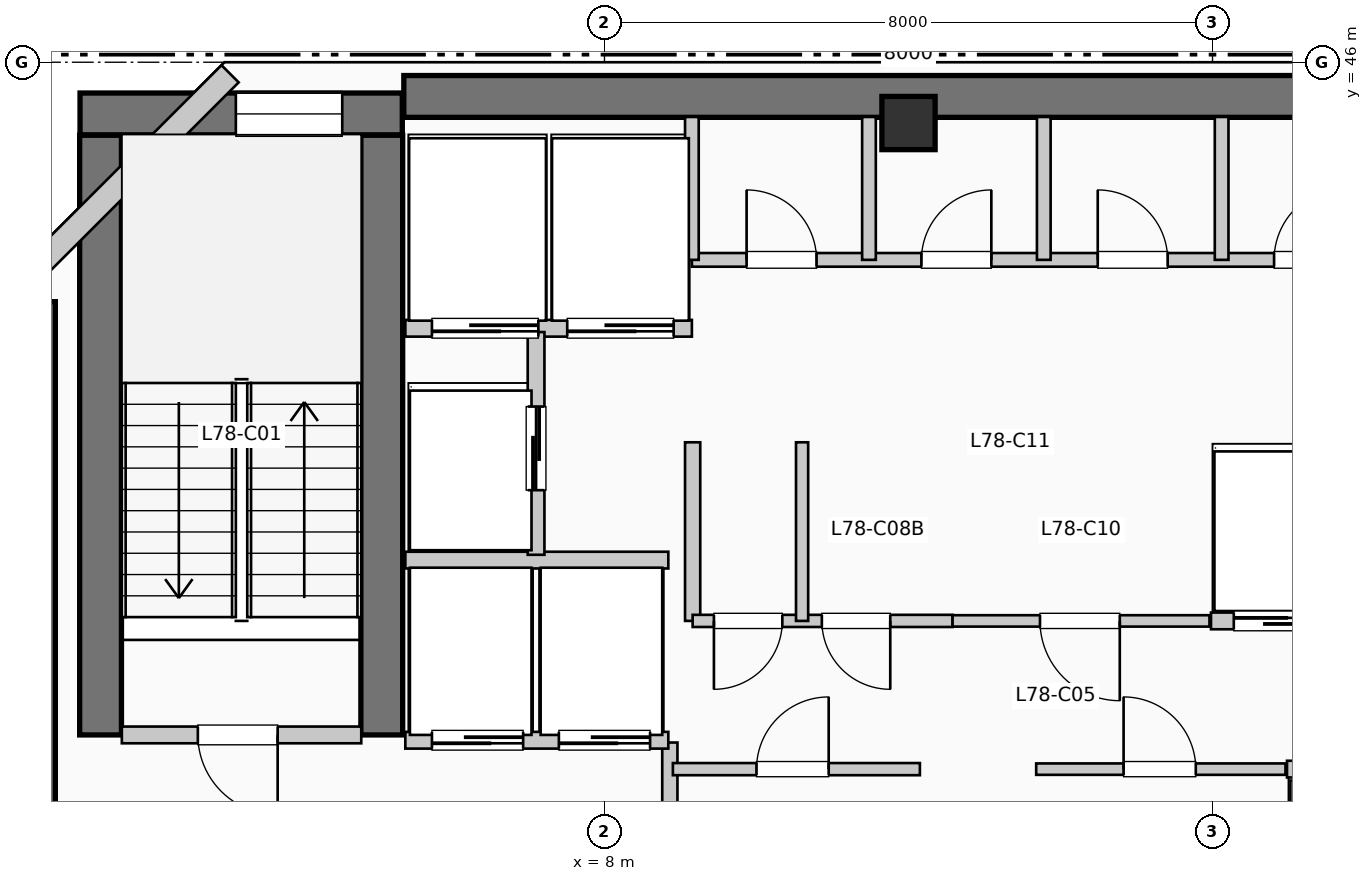
"""IFC4 building model, lengths in metres.
Left out: names, types, materials, properties, quantities, classifications, styles, units other than length and angle.
Written with IfcOpenShell. Run it as: python <this file> out.ifc"""

import sys

from ifc_helpers import new_model, si_unit, direction, frame, frame_2d, origin, origin_2d, place, context, subcontext, project, spatial, rectangle, extrude, element, fill, save


model = new_model("IFC4")
c1 = context("Model", 3, precision=1e-05, world=origin(), true_north=direction((0.0, 1.0)))
c2 = subcontext(c1, "Body", "Model", "MODEL_VIEW")
j1 = project(units=[si_unit("LENGTHUNIT", "METRE"), si_unit("PLANEANGLEUNIT", "RADIAN")], contexts=[c1])
p1 = place(None, origin())
s1 = spatial("IfcSite", under=j1, at=p1, CompositionType="ELEMENT")
p2 = place(p1, origin())
s2 = spatial("IfcBuilding", under=s1, at=p2, CompositionType="ELEMENT")
p3 = place(p2, frame((0.0, 0.0, 319.77)))
s3 = spatial("IfcBuildingStorey", under=s2, at=p3, CompositionType="ELEMENT", Elevation=319.77)
p4 = place(p3, frame((5.36, 45.55, 0.0), z_axis=(0.0, 0.0, 1.0), x_axis=(1.0, 0.0, 0.0)))
e1 = element("IfcWall", 1, at=p4, inside=s3, PredefinedType="SHEAR", context=c2, shape_type="SweptSolid", body=[
    extrude(rectangle(XDim=13.98, YDim=0.55, at=frame_2d((6.99, 0.0))), origin(), (0.0, 0.0, 1.0), 3.96),
])
p5 = place(p3, frame((0.5, 34.95, 0.0), z_axis=(0.0, 0.0, 1.0), x_axis=(0.0, 1.0, 0.0)))
e2 = element("IfcWall", 2, at=p5, inside=s3, PredefinedType="SHEAR", context=c2, shape_type="SweptSolid", body=[
    extrude(rectangle(XDim=7.9, YDim=0.55, at=frame_2d((3.95, 0.0))), origin(), (0.0, 0.0, 1.0), 3.96),
])
for number, where, z_axis, x_axis in (
    (3, (1.37, 37.15, 0.0), (0.0, 0.0, 1.0), (0.0, 1.0, 0.0)),
    (4, (5.07, 37.15, 0.0), (0.0, 0.0, 1.0), (0.0, 1.0, 0.0)),
):
    element("IfcWall", number, at=place(p3, frame(where, z_axis=z_axis, x_axis=x_axis)), inside=s3, PredefinedType="SHEAR", context=c2, shape_type="SweptSolid", body=[
        extrude(rectangle(XDim=7.89, YDim=0.55, at=frame_2d((3.945, 0.0))), origin(), (0.0, 0.0, 1.0), 3.96),
    ])
p6 = place(p3, frame((1.1, 45.32, 0.0), z_axis=(0.0, 0.0, 1.0), x_axis=(1.0, 0.0, 0.0)))
e5 = element("IfcWall", 5, at=p6, inside=s3, PredefinedType="SHEAR", context=c2, shape_type="SweptSolid", body=[
    extrude(rectangle(XDim=4.24, YDim=0.55, at=frame_2d((2.12, 0.0))), origin(), (0.0, 0.0, 1.0), 3.96),
])
p7 = place(p6, frame((2.05, 0.0, 1.05)))
e6 = element("IfcOpeningElement", 6, at=p7, cuts=e5, PredefinedType="OPENING", context=c2, shape_type="SweptSolid", body=[
    extrude(rectangle(XDim=1.4, YDim=1.8, at=frame_2d((0.7, 0.9))), frame((0.0, 0.285, 0.0), z_axis=(0.0, -1.0, 0.0), x_axis=(1.0, 0.0, 0.0)), (0.0, 0.0, 1.0), 0.57),
])
p8 = place(p3, frame((12.0, 45.2, 0.0), z_axis=(0.0, 0.0, 1.0), x_axis=(1.0, 0.0, 0.0)))
e7 = element("IfcColumn", 7, at=p8, inside=s3, PredefinedType="COLUMN", context=c2, shape_type="SweptSolid", body=[
    extrude(rectangle(XDim=0.7, YDim=0.7, at=origin_2d()), origin(), (0.0, 0.0, 1.0), 3.96),
])
p9 = place(p3, frame((3.074, 45.848, 0.0), z_axis=(0.0, 0.0, 1.0), x_axis=(-0.707106781187, -0.707106781187, 0.0)))
e8 = element("IfcWall", 8, at=p9, inside=s3, PredefinedType="SOLIDWALL", context=c2, shape_type="SweptSolid", body=[
    extrude(rectangle(XDim=4.133, YDim=0.32, at=frame_2d((2.066, 0.0))), origin(), (0.0, 0.0, 1.0), 3.74),
])
p10 = place(p3, frame((1.65, 37.15, 0.0), z_axis=(0.0, 0.0, 1.0), x_axis=(1.0, 0.0, 0.0)))
e9 = element("IfcWall", 9, at=p10, inside=s3, PredefinedType="PARTITIONING", context=c2, shape_type="SweptSolid", body=[
    extrude(rectangle(XDim=3.15, YDim=0.22, at=frame_2d((1.575, 0.0))), origin(), (0.0, 0.0, 1.0), 3.74),
])
p11 = place(p10, frame((2.05, 0.0, 0.0), z_axis=(0.0, 0.0, 1.0), x_axis=(-1.0, 0.0, 0.0)))
e10 = element("IfcOpeningElement", 10, at=p11, cuts=e9, PredefinedType="OPENING", context=c2, shape_type="SweptSolid", body=[
    extrude(rectangle(XDim=1.05, YDim=2.15, at=frame_2d((0.525, 1.075))), frame((0.0, 0.12, 0.0), z_axis=(0.0, -1.0, 0.0), x_axis=(1.0, 0.0, 0.0)), (0.0, 0.0, 1.0), 0.24),
])
p12 = place(p3, frame((8.86, 34.55, 0.0), z_axis=(0.0, 0.0, 1.0), x_axis=(0.0, 1.0, 0.0)))
e11 = element("IfcWall", 11, at=p12, inside=s3, PredefinedType="PARTITIONING", context=c2, shape_type="SweptSolid", body=[
    extrude(rectangle(XDim=2.5, YDim=0.2, at=frame_2d((1.25, 0.0))), origin(), (0.0, 0.0, 1.0), 3.74),
])
p13 = place(p3, frame((5.38, 37.08, 0.0), z_axis=(0.0, 0.0, 1.0), x_axis=(1.0, 0.0, 0.0)))
e12 = element("IfcWall", 12, at=p13, inside=s3, PredefinedType="PARTITIONING", context=c2, shape_type="SweptSolid", body=[
    extrude(rectangle(XDim=3.46, YDim=0.22, at=frame_2d((1.73, 0.0))), origin(), (0.0, 0.0, 1.0), 3.74),
])
p14 = place(p13, frame((1.55, 0.0, 0.0), z_axis=(0.0, 0.0, 1.0), x_axis=(-1.0, 0.0, 0.0)))
e13 = element("IfcOpeningElement", 13, at=p14, cuts=e12, PredefinedType="OPENING", context=c2, shape_type="SweptSolid", body=[
    extrude(rectangle(XDim=1.2, YDim=2.2, at=frame_2d((0.6, 1.1))), frame((0.0, 0.12, 0.0), z_axis=(0.0, -1.0, 0.0), x_axis=(1.0, 0.0, 0.0)), (0.0, 0.0, 1.0), 0.24),
])
p15 = place(p13, frame((3.22, 0.0, 0.0), z_axis=(0.0, 0.0, 1.0), x_axis=(-1.0, 0.0, 0.0)))
e14 = element("IfcOpeningElement", 14, at=p15, cuts=e12, PredefinedType="OPENING", context=c2, shape_type="SweptSolid", body=[
    extrude(rectangle(XDim=1.2, YDim=2.2, at=frame_2d((0.6, 1.1))), frame((0.0, 0.12, 0.0), z_axis=(0.0, -1.0, 0.0), x_axis=(1.0, 0.0, 0.0)), (0.0, 0.0, 1.0), 0.24),
])
p16 = place(p3, frame((5.38, 39.45, 0.0), z_axis=(0.0, 0.0, 1.0), x_axis=(1.0, 0.0, 0.0)))
e15 = element("IfcWall", 15, at=p16, inside=s3, PredefinedType="PARTITIONING", context=c2, shape_type="SweptSolid", body=[
    extrude(rectangle(XDim=3.46, YDim=0.22, at=frame_2d((1.73, 0.0))), origin(), (0.0, 0.0, 1.0), 3.74),
])
p17 = place(p3, frame((5.38, 42.5, 0.0), z_axis=(0.0, 0.0, 1.0), x_axis=(1.0, 0.0, 0.0)))
e16 = element("IfcWall", 16, at=p17, inside=s3, PredefinedType="PARTITIONING", context=c2, shape_type="SweptSolid", body=[
    extrude(rectangle(XDim=3.77, YDim=0.22, at=frame_2d((1.885, 0.0))), origin(), (0.0, 0.0, 1.0), 3.74),
])
p18 = place(p17, frame((1.75, 0.0, 0.0), z_axis=(0.0, 0.0, 1.0), x_axis=(-1.0, 0.0, 0.0)))
e17 = element("IfcOpeningElement", 17, at=p18, cuts=e16, PredefinedType="OPENING", context=c2, shape_type="SweptSolid", body=[
    extrude(rectangle(XDim=1.4, YDim=2.2, at=frame_2d((0.7, 1.1))), frame((0.0, 0.12, 0.0), z_axis=(0.0, -1.0, 0.0), x_axis=(1.0, 0.0, 0.0)), (0.0, 0.0, 1.0), 0.24),
])
p19 = place(p17, frame((3.53, 0.0, 0.0), z_axis=(0.0, 0.0, 1.0), x_axis=(-1.0, 0.0, 0.0)))
e18 = element("IfcOpeningElement", 18, at=p19, cuts=e16, PredefinedType="OPENING", context=c2, shape_type="SweptSolid", body=[
    extrude(rectangle(XDim=1.4, YDim=2.2, at=frame_2d((0.7, 1.1))), frame((0.0, 0.12, 0.0), z_axis=(0.0, -1.0, 0.0), x_axis=(1.0, 0.0, 0.0)), (0.0, 0.0, 1.0), 0.24),
])
p20 = place(p3, frame((7.1, 39.52, 0.0), z_axis=(0.0, 0.0, 1.0), x_axis=(0.0, 1.0, 0.0)))
e19 = element("IfcWall", 19, at=p20, inside=s3, PredefinedType="PARTITIONING", context=c2, shape_type="SweptSolid", body=[
    extrude(rectangle(XDim=2.93, YDim=0.22, at=frame_2d((1.465, 0.0))), origin(), (0.0, 0.0, 1.0), 3.74),
])
p21 = place(p20, frame((0.85, 0.0, 0.0)))
e20 = element("IfcOpeningElement", 20, at=p21, cuts=e19, PredefinedType="OPENING", context=c2, shape_type="SweptSolid", body=[
    extrude(rectangle(XDim=1.1, YDim=2.2, at=frame_2d((0.55, 1.1))), frame((0.0, 0.12, 0.0), z_axis=(0.0, -1.0, 0.0), x_axis=(1.0, 0.0, 0.0)), (0.0, 0.0, 1.0), 0.24),
])
p22 = place(p3, frame((9.16, 38.65, 0.0), z_axis=(0.0, 0.0, 1.0), x_axis=(0.0, 1.0, 0.0)))
e21 = element("IfcWall", 21, at=p22, inside=s3, PredefinedType="PARTITIONING", context=c2, shape_type="SweptSolid", body=[
    extrude(rectangle(XDim=2.35, YDim=0.2, at=frame_2d((1.175, 0.0))), origin(), (0.0, 0.0, 1.0), 3.74),
])
p23 = place(p3, frame((8.9, 36.7, 0.0), z_axis=(0.0, 0.0, 1.0), x_axis=(1.0, 0.0, 0.0)))
e22 = element("IfcWall", 22, at=p23, inside=s3, PredefinedType="PARTITIONING", context=c2, shape_type="SweptSolid", body=[
    extrude(rectangle(XDim=3.25, YDim=0.16, at=frame_2d((1.625, 0.0))), origin(), (0.0, 0.0, 1.0), 3.74),
])
p24 = place(p23, frame((1.1, 0.0, 0.0)))
e23 = element("IfcOpeningElement", 23, at=p24, cuts=e22, PredefinedType="OPENING", context=c2, shape_type="SweptSolid", body=[
    extrude(rectangle(XDim=0.95, YDim=2.15, at=frame_2d((0.475, 1.075))), frame((0.0, 0.09, 0.0), z_axis=(0.0, -1.0, 0.0), x_axis=(1.0, 0.0, 0.0)), (0.0, 0.0, 1.0), 0.18),
])
p25 = place(p3, frame((9.16, 38.65, 0.0), z_axis=(0.0, 0.0, 1.0), x_axis=(1.0, 0.0, 0.0)))
e24 = element("IfcWall", 24, at=p25, inside=s3, PredefinedType="PARTITIONING", context=c2, shape_type="SweptSolid", body=[
    extrude(rectangle(XDim=3.42, YDim=0.16, at=frame_2d((1.71, 0.0))), origin(), (0.0, 0.0, 1.0), 3.74),
])
p26 = place(p25, frame((1.18, 0.0, 0.0), z_axis=(0.0, 0.0, 1.0), x_axis=(-1.0, 0.0, 0.0)))
e25 = element("IfcOpeningElement", 25, at=p26, cuts=e24, PredefinedType="OPENING", context=c2, shape_type="SweptSolid", body=[
    extrude(rectangle(XDim=0.9, YDim=2.15, at=frame_2d((0.45, 1.075))), frame((0.0, 0.09, 0.0), z_axis=(0.0, -1.0, 0.0), x_axis=(1.0, 0.0, 0.0)), (0.0, 0.0, 1.0), 0.18),
])
p27 = place(p25, frame((2.6, 0.0, 0.0), z_axis=(0.0, 0.0, 1.0), x_axis=(-1.0, 0.0, 0.0)))
e26 = element("IfcOpeningElement", 26, at=p27, cuts=e24, PredefinedType="OPENING", context=c2, shape_type="SweptSolid", body=[
    extrude(rectangle(XDim=0.9, YDim=2.15, at=frame_2d((0.45, 1.075))), frame((0.0, 0.09, 0.0), z_axis=(0.0, -1.0, 0.0), x_axis=(1.0, 0.0, 0.0)), (0.0, 0.0, 1.0), 0.18),
])
p28 = place(p3, frame((10.6, 38.65, 0.0), z_axis=(0.0, 0.0, 1.0), x_axis=(0.0, 1.0, 0.0)))
e27 = element("IfcWall", 27, at=p28, inside=s3, PredefinedType="PARTITIONING", context=c2, shape_type="SweptSolid", body=[
    extrude(rectangle(XDim=2.35, YDim=0.16, at=frame_2d((1.175, 0.0))), origin(), (0.0, 0.0, 1.0), 3.74),
])
p29 = place(p3, frame((13.68, 36.7, 0.0), z_axis=(0.0, 0.0, 1.0), x_axis=(1.0, 0.0, 0.0)))
e28 = element("IfcWall", 28, at=p29, inside=s3, PredefinedType="PARTITIONING", context=c2, shape_type="SweptSolid", body=[
    extrude(rectangle(XDim=3.28, YDim=0.15, at=frame_2d((1.64, 0.0))), origin(), (0.0, 0.0, 1.0), 3.74),
])
p30 = place(p29, frame((1.15, 0.0, 0.0)))
e29 = element("IfcOpeningElement", 29, at=p30, cuts=e28, PredefinedType="OPENING", context=c2, shape_type="SweptSolid", body=[
    extrude(rectangle(XDim=0.95, YDim=2.15, at=frame_2d((0.475, 1.075))), frame((0.0, 0.085, 0.0), z_axis=(0.0, -1.0, 0.0), x_axis=(1.0, 0.0, 0.0)), (0.0, 0.0, 1.0), 0.17),
])
p31 = place(p3, frame((12.58, 38.65, 0.0), z_axis=(0.0, 0.0, 1.0), x_axis=(1.0, 0.0, 0.0)))
e30 = element("IfcWall", 30, at=p31, inside=s3, PredefinedType="PARTITIONING", context=c2, shape_type="SweptSolid", body=[
    extrude(rectangle(XDim=3.38, YDim=0.15, at=frame_2d((1.69, 0.0))), origin(), (0.0, 0.0, 1.0), 3.74),
])
p32 = place(p31, frame((2.2, 0.0, 0.0), z_axis=(0.0, 0.0, 1.0), x_axis=(-1.0, 0.0, 0.0)))
e31 = element("IfcOpeningElement", 31, at=p32, cuts=e30, PredefinedType="OPENING", context=c2, shape_type="SweptSolid", body=[
    extrude(rectangle(XDim=1.05, YDim=2.15, at=frame_2d((0.525, 1.075))), frame((0.0, 0.085, 0.0), z_axis=(0.0, -1.0, 0.0), x_axis=(1.0, 0.0, 0.0)), (0.0, 0.0, 1.0), 0.17),
])
p33 = place(p3, frame((16.98, 36.7, 0.0), z_axis=(0.0, 0.0, 1.0), x_axis=(1.0, 0.0, 0.0)))
e32 = element("IfcWall", 32, at=p33, inside=s3, PredefinedType="PARTITIONING", context=c2, shape_type="SweptSolid", body=[
    extrude(rectangle(XDim=1.7, YDim=0.22, at=frame_2d((0.85, 0.0))), origin(), (0.0, 0.0, 1.0), 3.74),
])
p34 = place(p33, frame((0.3, 0.0, 0.0)))
e33 = element("IfcOpeningElement", 33, at=p34, cuts=e32, PredefinedType="OPENING", context=c2, shape_type="SweptSolid", body=[
    extrude(rectangle(XDim=1.1, YDim=2.2, at=frame_2d((0.55, 1.1))), frame((0.0, 0.12, 0.0), z_axis=(0.0, -1.0, 0.0), x_axis=(1.0, 0.0, 0.0)), (0.0, 0.0, 1.0), 0.24),
])
p35 = place(p3, frame((15.98, 38.65, 0.0), z_axis=(0.0, 0.0, 1.0), x_axis=(1.0, 0.0, 0.0)))
e34 = element("IfcWall", 34, at=p35, inside=s3, PredefinedType="PARTITIONING", context=c2, shape_type="SweptSolid", body=[
    extrude(rectangle(XDim=1.72, YDim=0.22, at=frame_2d((0.86, 0.0))), origin(), (0.0, 0.0, 1.0), 3.74),
])
p36 = place(p35, frame((0.3, 0.0, 0.0)))
e35 = element("IfcOpeningElement", 35, at=p36, cuts=e34, PredefinedType="OPENING", context=c2, shape_type="SweptSolid", body=[
    extrude(rectangle(XDim=1.1, YDim=2.2, at=frame_2d((0.55, 1.1))), frame((0.0, 0.12, 0.0), z_axis=(0.0, -1.0, 0.0), x_axis=(1.0, 0.0, 0.0)), (0.0, 0.0, 1.0), 0.24),
])
p37 = place(p3, frame((9.15, 43.4, 0.0), z_axis=(0.0, 0.0, 1.0), x_axis=(1.0, 0.0, 0.0)))
e36 = element("IfcWall", 36, at=p37, inside=s3, PredefinedType="PLUMBINGWALL", context=c2, shape_type="SweptSolid", body=[
    extrude(rectangle(XDim=9.33, YDim=0.18, at=frame_2d((4.665, 0.0))), origin(), (0.0, 0.0, 1.0), 3.74),
])
p38 = place(p37, frame((0.72, 0.0, 0.0)))
e37 = element("IfcOpeningElement", 37, at=p38, cuts=e36, PredefinedType="OPENING", context=c2, shape_type="SweptSolid", body=[
    extrude(rectangle(XDim=0.92, YDim=2.1, at=frame_2d((0.46, 1.05))), frame((0.0, 0.1, 0.0), z_axis=(0.0, -1.0, 0.0), x_axis=(1.0, 0.0, 0.0)), (0.0, 0.0, 1.0), 0.2),
])
p39 = place(p37, frame((3.02, 0.0, 0.0)))
e38 = element("IfcOpeningElement", 38, at=p39, cuts=e36, PredefinedType="OPENING", context=c2, shape_type="SweptSolid", body=[
    extrude(rectangle(XDim=0.92, YDim=2.1, at=frame_2d((0.46, 1.05))), frame((0.0, 0.1, 0.0), z_axis=(0.0, -1.0, 0.0), x_axis=(1.0, 0.0, 0.0)), (0.0, 0.0, 1.0), 0.2),
])
p40 = place(p37, frame((5.34, 0.0, 0.0)))
e39 = element("IfcOpeningElement", 39, at=p40, cuts=e36, PredefinedType="OPENING", context=c2, shape_type="SweptSolid", body=[
    extrude(rectangle(XDim=0.92, YDim=2.1, at=frame_2d((0.46, 1.05))), frame((0.0, 0.1, 0.0), z_axis=(0.0, -1.0, 0.0), x_axis=(1.0, 0.0, 0.0)), (0.0, 0.0, 1.0), 0.2),
])
p41 = place(p37, frame((7.66, 0.0, 0.0)))
e40 = element("IfcOpeningElement", 40, at=p41, cuts=e36, PredefinedType="OPENING", context=c2, shape_type="SweptSolid", body=[
    extrude(rectangle(XDim=0.95, YDim=2.1, at=frame_2d((0.475, 1.05))), frame((0.0, 0.1, 0.0), z_axis=(0.0, -1.0, 0.0), x_axis=(1.0, 0.0, 0.0)), (0.0, 0.0, 1.0), 0.2),
])
for number, where, z_axis, x_axis in (
    (41, (9.15, 43.4, 0.0), (0.0, 0.0, 1.0), (0.0, 1.0, 0.0)),
    (42, (11.48, 43.4, 0.0), (0.0, 0.0, 1.0), (0.0, 1.0, 0.0)),
    (43, (13.78, 43.4, 0.0), (0.0, 0.0, 1.0), (0.0, 1.0, 0.0)),
    (44, (16.12, 43.4, 0.0), (0.0, 0.0, 1.0), (0.0, 1.0, 0.0)),
):
    element("IfcWall", number, at=place(p3, frame(where, z_axis=z_axis, x_axis=x_axis)), inside=s3, PredefinedType="PLUMBINGWALL", context=c2, shape_type="SweptSolid", body=[
        extrude(rectangle(XDim=1.88, YDim=0.18, at=frame_2d((0.94, 0.0))), origin(), (0.0, 0.0, 1.0), 3.74),
    ])
p42 = place(p7, origin())
e45 = element("IfcWindow", 45, at=p42, inside=s3, PartitioningType="SINGLE_PANEL", PredefinedType="WINDOW", context=c2, shape_type="SweptSolid", body=[
    extrude(rectangle(XDim=1.4, YDim=1.8, at=frame_2d((0.7, 0.9))), frame((0.0, 0.03, 0.0), z_axis=(0.0, -1.0, 0.0), x_axis=(1.0, 0.0, 0.0)), (0.0, 0.0, 1.0), 0.06),
])
fill(e6, e45)
p43 = place(p11, origin())
e46 = element("IfcDoor", 46, at=p43, inside=s3, OperationType="SINGLE_SWING_RIGHT", PredefinedType="DOOR", context=c2, shape_type="SweptSolid", body=[
    extrude(rectangle(XDim=1.05, YDim=2.15, at=frame_2d((0.525, 1.075))), frame((0.0, 0.025, 0.0), z_axis=(0.0, -1.0, 0.0), x_axis=(1.0, 0.0, 0.0)), (0.0, 0.0, 1.0), 0.05),
])
fill(e10, e46)
p44 = place(p14, origin())
e47 = element("IfcDoor", 47, at=p44, inside=s3, OperationType="SLIDING_TO_RIGHT", PredefinedType="DOOR", context=c2, shape_type="SweptSolid", body=[
    extrude(rectangle(XDim=1.2, YDim=2.2, at=frame_2d((0.6, 1.1))), frame((0.0, 0.025, 0.0), z_axis=(0.0, -1.0, 0.0), x_axis=(1.0, 0.0, 0.0)), (0.0, 0.0, 1.0), 0.05),
])
fill(e13, e47)
p45 = place(p15, origin())
e48 = element("IfcDoor", 48, at=p45, inside=s3, OperationType="SLIDING_TO_RIGHT", PredefinedType="DOOR", context=c2, shape_type="SweptSolid", body=[
    extrude(rectangle(XDim=1.2, YDim=2.2, at=frame_2d((0.6, 1.1))), frame((0.0, 0.025, 0.0), z_axis=(0.0, -1.0, 0.0), x_axis=(1.0, 0.0, 0.0)), (0.0, 0.0, 1.0), 0.05),
])
fill(e14, e48)
p46 = place(p18, origin())
e49 = element("IfcDoor", 49, at=p46, inside=s3, OperationType="SLIDING_TO_LEFT", PredefinedType="DOOR", context=c2, shape_type="SweptSolid", body=[
    extrude(rectangle(XDim=1.4, YDim=2.2, at=frame_2d((0.7, 1.1))), frame((0.0, 0.025, 0.0), z_axis=(0.0, -1.0, 0.0), x_axis=(1.0, 0.0, 0.0)), (0.0, 0.0, 1.0), 0.05),
])
fill(e17, e49)
p47 = place(p19, origin())
e50 = element("IfcDoor", 50, at=p47, inside=s3, OperationType="SLIDING_TO_LEFT", PredefinedType="DOOR", context=c2, shape_type="SweptSolid", body=[
    extrude(rectangle(XDim=1.4, YDim=2.2, at=frame_2d((0.7, 1.1))), frame((0.0, 0.025, 0.0), z_axis=(0.0, -1.0, 0.0), x_axis=(1.0, 0.0, 0.0)), (0.0, 0.0, 1.0), 0.05),
])
fill(e18, e50)
p48 = place(p21, origin())
e51 = element("IfcDoor", 51, at=p48, inside=s3, OperationType="SLIDING_TO_LEFT", PredefinedType="DOOR", context=c2, shape_type="SweptSolid", body=[
    extrude(rectangle(XDim=1.1, YDim=2.2, at=frame_2d((0.55, 1.1))), frame((0.0, 0.025, 0.0), z_axis=(0.0, -1.0, 0.0), x_axis=(1.0, 0.0, 0.0)), (0.0, 0.0, 1.0), 0.05),
])
fill(e20, e51)
p49 = place(p24, origin())
e52 = element("IfcDoor", 52, at=p49, inside=s3, OperationType="SINGLE_SWING_RIGHT", PredefinedType="DOOR", context=c2, shape_type="SweptSolid", body=[
    extrude(rectangle(XDim=0.95, YDim=2.15, at=frame_2d((0.475, 1.075))), frame((0.0, 0.025, 0.0), z_axis=(0.0, -1.0, 0.0), x_axis=(1.0, 0.0, 0.0)), (0.0, 0.0, 1.0), 0.05),
])
fill(e23, e52)
p50 = place(p26, origin())
e53 = element("IfcDoor", 53, at=p50, inside=s3, OperationType="SINGLE_SWING_LEFT", PredefinedType="DOOR", context=c2, shape_type="SweptSolid", body=[
    extrude(rectangle(XDim=0.9, YDim=2.15, at=frame_2d((0.45, 1.075))), frame((0.0, 0.025, 0.0), z_axis=(0.0, -1.0, 0.0), x_axis=(1.0, 0.0, 0.0)), (0.0, 0.0, 1.0), 0.05),
])
fill(e25, e53)
p51 = place(p27, origin())
e54 = element("IfcDoor", 54, at=p51, inside=s3, OperationType="SINGLE_SWING_RIGHT", PredefinedType="DOOR", context=c2, shape_type="SweptSolid", body=[
    extrude(rectangle(XDim=0.9, YDim=2.15, at=frame_2d((0.45, 1.075))), frame((0.0, 0.025, 0.0), z_axis=(0.0, -1.0, 0.0), x_axis=(1.0, 0.0, 0.0)), (0.0, 0.0, 1.0), 0.05),
])
fill(e26, e54)
p52 = place(p30, origin())
e55 = element("IfcDoor", 55, at=p52, inside=s3, OperationType="SINGLE_SWING_LEFT", PredefinedType="DOOR", context=c2, shape_type="SweptSolid", body=[
    extrude(rectangle(XDim=0.95, YDim=2.15, at=frame_2d((0.475, 1.075))), frame((0.0, 0.025, 0.0), z_axis=(0.0, -1.0, 0.0), x_axis=(1.0, 0.0, 0.0)), (0.0, 0.0, 1.0), 0.05),
])
fill(e29, e55)
p53 = place(p32, origin())
e56 = element("IfcDoor", 56, at=p53, inside=s3, OperationType="SINGLE_SWING_RIGHT", PredefinedType="DOOR", context=c2, shape_type="SweptSolid", body=[
    extrude(rectangle(XDim=1.05, YDim=2.15, at=frame_2d((0.525, 1.075))), frame((0.0, 0.025, 0.0), z_axis=(0.0, -1.0, 0.0), x_axis=(1.0, 0.0, 0.0)), (0.0, 0.0, 1.0), 0.05),
])
fill(e31, e56)
p54 = place(p36, origin())
e57 = element("IfcDoor", 57, at=p54, inside=s3, OperationType="SLIDING_TO_LEFT", PredefinedType="DOOR", context=c2, shape_type="SweptSolid", body=[
    extrude(rectangle(XDim=1.1, YDim=2.2, at=frame_2d((0.55, 1.1))), frame((0.0, 0.025, 0.0), z_axis=(0.0, -1.0, 0.0), x_axis=(1.0, 0.0, 0.0)), (0.0, 0.0, 1.0), 0.05),
])
fill(e35, e57)
p55 = place(p38, origin())
e58 = element("IfcDoor", 58, at=p55, inside=s3, OperationType="SINGLE_SWING_LEFT", PredefinedType="DOOR", context=c2, shape_type="SweptSolid", body=[
    extrude(rectangle(XDim=0.92, YDim=2.1, at=frame_2d((0.46, 1.05))), frame((0.0, 0.025, 0.0), z_axis=(0.0, -1.0, 0.0), x_axis=(1.0, 0.0, 0.0)), (0.0, 0.0, 1.0), 0.05),
])
fill(e37, e58)
p56 = place(p39, origin())
e59 = element("IfcDoor", 59, at=p56, inside=s3, OperationType="SINGLE_SWING_RIGHT", PredefinedType="DOOR", context=c2, shape_type="SweptSolid", body=[
    extrude(rectangle(XDim=0.92, YDim=2.1, at=frame_2d((0.46, 1.05))), frame((0.0, 0.025, 0.0), z_axis=(0.0, -1.0, 0.0), x_axis=(1.0, 0.0, 0.0)), (0.0, 0.0, 1.0), 0.05),
])
fill(e38, e59)
p57 = place(p40, origin())
e60 = element("IfcDoor", 60, at=p57, inside=s3, OperationType="SINGLE_SWING_LEFT", PredefinedType="DOOR", context=c2, shape_type="SweptSolid", body=[
    extrude(rectangle(XDim=0.92, YDim=2.1, at=frame_2d((0.46, 1.05))), frame((0.0, 0.025, 0.0), z_axis=(0.0, -1.0, 0.0), x_axis=(1.0, 0.0, 0.0)), (0.0, 0.0, 1.0), 0.05),
])
fill(e39, e60)
p58 = place(p41, origin())
e61 = element("IfcDoor", 61, at=p58, inside=s3, OperationType="SINGLE_SWING_RIGHT", PredefinedType="DOOR", context=c2, shape_type="SweptSolid", body=[
    extrude(rectangle(XDim=0.95, YDim=2.1, at=frame_2d((0.475, 1.05))), frame((0.0, 0.025, 0.0), z_axis=(0.0, -1.0, 0.0), x_axis=(1.0, 0.0, 0.0)), (0.0, 0.0, 1.0), 0.05),
])
fill(e40, e61)
save(model, sys.argv[1])
